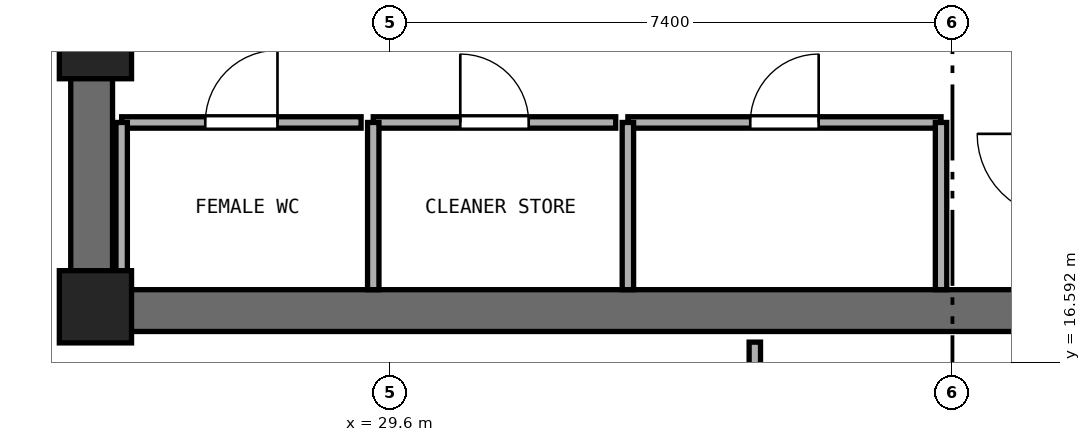
"""IFC4 building model, lengths in metres.
Left out: names, types, materials, properties, quantities, classifications, styles, units other than length and angle.
Written with IfcOpenShell. Run it as: python <this file> out.ifc"""

import sys

from ifc_helpers import new_model, si_unit, direction, frame, frame_2d, origin, origin_2d, place, context, subcontext, project, spatial, rectangle, extrude, element, fill, save


model = new_model("IFC4")
c1 = context("Model", 3, precision=1e-05, world=origin(), true_north=direction((0.0, 1.0)))
c2 = subcontext(c1, "Body", "Model", "MODEL_VIEW")
j1 = project(units=[si_unit("LENGTHUNIT", "METRE"), si_unit("PLANEANGLEUNIT", "RADIAN")], contexts=[c1])
p1 = place(None, origin())
s1 = spatial("IfcSite", under=j1, at=p1, CompositionType="ELEMENT")
p2 = place(p1, origin())
s2 = spatial("IfcBuilding", under=s1, at=p2, CompositionType="ELEMENT")
p3 = place(p2, frame((0.0, 0.0, 178.2)))
s3 = spatial("IfcBuildingStorey", under=s2, at=p3, CompositionType="ELEMENT", Elevation=178.2)
p4 = place(p3, frame((25.4, 17.275, 0.0), z_axis=(0.0, 0.0, 1.0), x_axis=(1.0, 0.0, 0.0)))
e1 = element("IfcWall", 1, at=p4, inside=s3, PredefinedType="SHEAR", context=c2, shape_type="SweptSolid", body=[
    extrude(rectangle(XDim=23.2, YDim=0.55, at=frame_2d((11.6, 0.0))), origin(), (0.0, 0.0, 1.0), 3.54),
])
p5 = place(p3, frame((25.675, 17.55, 0.0), z_axis=(0.0, 0.0, 1.0), x_axis=(0.0, 1.0, 0.0)))
e2 = element("IfcWall", 2, at=p5, inside=s3, PredefinedType="SHEAR", context=c2, shape_type="SweptSolid", body=[
    extrude(rectangle(XDim=15.3, YDim=0.55, at=frame_2d((7.65, 0.0))), origin(), (0.0, 0.0, 1.0), 3.54),
])
p6 = place(p5, frame((6.9, 0.0, 0.0)))
e3 = element("IfcOpeningElement", 3, at=p6, cuts=e2, PredefinedType="OPENING", context=c2, shape_type="SweptSolid", body=[
    extrude(rectangle(XDim=1.5, YDim=2.15, at=frame_2d((0.75, 1.075))), frame((0.0, 0.285, 0.0), z_axis=(0.0, -1.0, 0.0), x_axis=(1.0, 0.0, 0.0)), (0.0, 0.0, 1.0), 0.57),
])
for number, where, z_axis, x_axis in (
    (4, (25.725, 17.325, 0.0), (0.0, 0.0, 1.0), (1.0, 0.0, 0.0)),
    (5, (25.725, 20.8, 0.0), (0.0, 0.0, 1.0), (1.0, 0.0, 0.0)),
):
    element("IfcColumn", number, at=place(p3, frame(where, z_axis=z_axis, x_axis=x_axis)), inside=s3, PredefinedType="PILASTER", context=c2, shape_type="SweptSolid", body=[
        extrude(rectangle(XDim=0.95, YDim=0.95, at=origin_2d()), origin(), (0.0, 0.0, 1.0), 3.8),
    ])
p7 = place(p3, frame((26.07, 19.75, 0.0), z_axis=(0.0, 0.0, 1.0), x_axis=(1.0, 0.0, 0.0)))
e6 = element("IfcWall", 6, at=p7, inside=s3, PredefinedType="PARTITIONING", context=c2, shape_type="SweptSolid", body=[
    extrude(rectangle(XDim=3.15, YDim=0.15, at=frame_2d((1.575, 0.0))), origin(), (0.0, 0.0, 1.0), 3.54),
])
p8 = place(p7, frame((1.1, 0.0, 0.0)))
e7 = element("IfcOpeningElement", 7, at=p8, cuts=e6, PredefinedType="OPENING", context=c2, shape_type="SweptSolid", body=[
    extrude(rectangle(XDim=0.95, YDim=2.1, at=frame_2d((0.475, 1.05))), frame((0.0, 0.085, 0.0), z_axis=(0.0, -1.0, 0.0), x_axis=(1.0, 0.0, 0.0)), (0.0, 0.0, 1.0), 0.17),
])
p9 = place(p3, frame((26.07, 17.55, 0.0), z_axis=(0.0, 0.0, 1.0), x_axis=(0.0, 1.0, 0.0)))
e8 = element("IfcWall", 8, at=p9, inside=s3, PredefinedType="PARTITIONING", context=c2, shape_type="SweptSolid", body=[
    extrude(rectangle(XDim=2.2, YDim=0.15, at=frame_2d((1.1, 0.0))), origin(), (0.0, 0.0, 1.0), 2.64),
])
p10 = place(p3, frame((29.38, 19.75, 0.0), z_axis=(0.0, 0.0, 1.0), x_axis=(1.0, 0.0, 0.0)))
e9 = element("IfcWall", 9, at=p10, inside=s3, PredefinedType="PARTITIONING", context=c2, shape_type="SweptSolid", body=[
    extrude(rectangle(XDim=3.19, YDim=0.15, at=frame_2d((1.595, 0.0))), origin(), (0.0, 0.0, 1.0), 3.54),
])
p11 = place(p10, frame((1.145, 0.0, 0.0)))
e10 = element("IfcOpeningElement", 10, at=p11, cuts=e9, PredefinedType="OPENING", context=c2, shape_type="SweptSolid", body=[
    extrude(rectangle(XDim=0.9, YDim=2.1, at=frame_2d((0.45, 1.05))), frame((0.0, 0.085, 0.0), z_axis=(0.0, -1.0, 0.0), x_axis=(1.0, 0.0, 0.0)), (0.0, 0.0, 1.0), 0.17),
])
p12 = place(p3, frame((29.38, 17.55, 0.0), z_axis=(0.0, 0.0, 1.0), x_axis=(0.0, 1.0, 0.0)))
e11 = element("IfcWall", 11, at=p12, inside=s3, PredefinedType="PARTITIONING", context=c2, shape_type="SweptSolid", body=[
    extrude(rectangle(XDim=2.2, YDim=0.15, at=frame_2d((1.1, 0.0))), origin(), (0.0, 0.0, 1.0), 3.54),
])
p13 = place(p3, frame((32.73, 19.75, 0.0), z_axis=(0.0, 0.0, 1.0), x_axis=(1.0, 0.0, 0.0)))
e12 = element("IfcWall", 12, at=p13, inside=s3, PredefinedType="PARTITIONING", context=c2, shape_type="SweptSolid", body=[
    extrude(rectangle(XDim=4.12, YDim=0.15, at=frame_2d((2.06, 0.0))), origin(), (0.0, 0.0, 1.0), 3.54),
])
p14 = place(p13, frame((1.61, 0.0, 0.0)))
e13 = element("IfcOpeningElement", 13, at=p14, cuts=e12, PredefinedType="OPENING", context=c2, shape_type="SweptSolid", body=[
    extrude(rectangle(XDim=0.9, YDim=2.1, at=frame_2d((0.45, 1.05))), frame((0.0, 0.085, 0.0), z_axis=(0.0, -1.0, 0.0), x_axis=(1.0, 0.0, 0.0)), (0.0, 0.0, 1.0), 0.17),
])
for number, where, z_axis, x_axis in (
    (14, (32.73, 17.55, 0.0), (0.0, 0.0, 1.0), (0.0, 1.0, 0.0)),
    (15, (36.85, 17.55, 0.0), (0.0, 0.0, 1.0), (0.0, 1.0, 0.0)),
):
    element("IfcWall", number, at=place(p3, frame(where, z_axis=z_axis, x_axis=x_axis)), inside=s3, PredefinedType="PARTITIONING", context=c2, shape_type="SweptSolid", body=[
        extrude(rectangle(XDim=2.2, YDim=0.15, at=frame_2d((1.1, 0.0))), origin(), (0.0, 0.0, 1.0), 3.54),
    ])
p15 = place(p3, frame((34.4, 13.7, 0.0), z_axis=(0.0, 0.0, 1.0), x_axis=(0.0, 1.0, 0.0)))
e16 = element("IfcWall", 16, at=p15, inside=s3, PredefinedType="PARTITIONING", context=c2, shape_type="SweptSolid", body=[
    extrude(rectangle(XDim=3.16, YDim=0.15, at=frame_2d((1.58, 0.0))), origin(), (0.0, 0.0, 1.0), 3.54),
])
p16 = place(p15, frame((1.13, 0.0, 0.0)))
e17 = element("IfcOpeningElement", 17, at=p16, cuts=e16, PredefinedType="OPENING", context=c2, shape_type="SweptSolid", body=[
    extrude(rectangle(XDim=0.9, YDim=2.1, at=frame_2d((0.45, 1.05))), frame((0.0, 0.085, 0.0), z_axis=(0.0, -1.0, 0.0), x_axis=(1.0, 0.0, 0.0)), (0.0, 0.0, 1.0), 0.17),
])
p17 = place(p8, origin())
e18 = element("IfcDoor", 18, at=p17, inside=s3, OperationType="SINGLE_SWING_RIGHT", PredefinedType="DOOR", context=c2, shape_type="SweptSolid", body=[
    extrude(rectangle(XDim=0.95, YDim=2.1, at=frame_2d((0.475, 1.05))), frame((0.0, 0.025, 0.0), z_axis=(0.0, -1.0, 0.0), x_axis=(1.0, 0.0, 0.0)), (0.0, 0.0, 1.0), 0.05),
])
fill(e7, e18)
p18 = place(p11, origin())
e19 = element("IfcDoor", 19, at=p18, inside=s3, OperationType="SINGLE_SWING_LEFT", PredefinedType="DOOR", context=c2, shape_type="SweptSolid", body=[
    extrude(rectangle(XDim=0.9, YDim=2.1, at=frame_2d((0.45, 1.05))), frame((0.0, 0.025, 0.0), z_axis=(0.0, -1.0, 0.0), x_axis=(1.0, 0.0, 0.0)), (0.0, 0.0, 1.0), 0.05),
])
fill(e10, e19)
p19 = place(p14, origin())
e20 = element("IfcDoor", 20, at=p19, inside=s3, OperationType="SINGLE_SWING_RIGHT", PredefinedType="DOOR", context=c2, shape_type="SweptSolid", body=[
    extrude(rectangle(XDim=0.9, YDim=2.1, at=frame_2d((0.45, 1.05))), frame((0.0, 0.025, 0.0), z_axis=(0.0, -1.0, 0.0), x_axis=(1.0, 0.0, 0.0)), (0.0, 0.0, 1.0), 0.05),
])
fill(e13, e20)
save(model, sys.argv[1])
